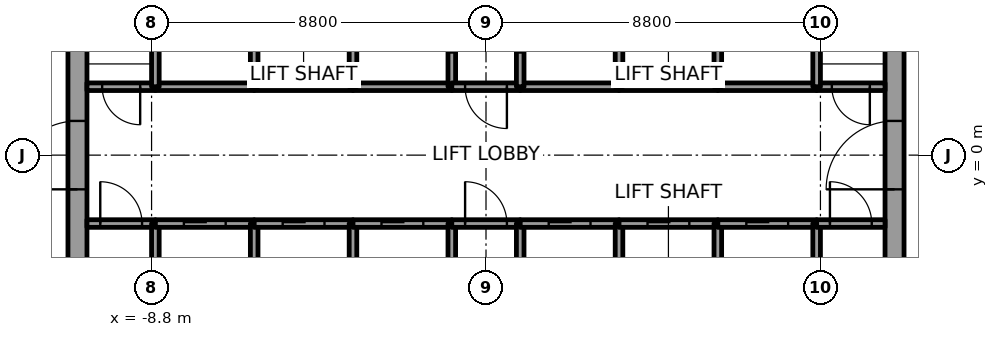
"""IFC4 building model, lengths in metres.
Left out: names, types, materials, properties, quantities, classifications, styles, units other than length and angle.
Written with IfcOpenShell. Run it as: python <this file> out.ifc"""

import sys

from ifc_helpers import new_model, si_unit, direction, frame, frame_2d, origin, place, context, subcontext, project, spatial, rectangle, extrude, element, fill, save


model = new_model("IFC4")
c1 = context("Model", 3, precision=1e-05, world=origin(), true_north=direction((0.0, 1.0)))
c2 = subcontext(c1, "Body", "Model", "MODEL_VIEW")
j1 = project(units=[si_unit("LENGTHUNIT", "METRE"), si_unit("PLANEANGLEUNIT", "RADIAN")], contexts=[c1])
p1 = place(None, origin())
s1 = spatial("IfcSite", under=j1, at=p1, CompositionType="ELEMENT")
p2 = place(p1, origin())
s2 = spatial("IfcBuilding", under=s1, at=p2, CompositionType="ELEMENT")
p3 = place(p2, frame((0.0, 0.0, 85.0)))
s3 = spatial("IfcBuildingStorey", under=s2, at=p3, CompositionType="ELEMENT", Elevation=85.0)
p4 = place(p3, frame((-10.75, -7.5, 0.0), z_axis=(0.0, 0.0, 1.0), x_axis=(0.0, 1.0, 0.0)))
e1 = element("IfcWall", 1, at=p4, inside=s3, PredefinedType="SHEAR", context=c2, shape_type="SweptSolid", body=[
    extrude(rectangle(XDim=15.0, YDim=0.5, at=frame_2d((7.5, 0.0))), origin(), (0.0, 0.0, 1.0), 3.7),
])
p5 = place(p4, frame((6.6, 0.0, 0.0)))
e2 = element("IfcOpeningElement", 2, at=p5, cuts=e1, PredefinedType="OPENING", context=c2, shape_type="SweptSolid", body=[
    extrude(rectangle(XDim=1.8, YDim=2.1, at=frame_2d((0.9, 1.05))), frame((0.0, 0.25, 0.0), z_axis=(0.0, -1.0, 0.0), x_axis=(1.0, 0.0, 0.0)), (0.0, 0.0, 1.0), 0.5),
])
p6 = place(p3, frame((10.75, -7.5, 0.0), z_axis=(0.0, 0.0, 1.0), x_axis=(0.0, 1.0, 0.0)))
e3 = element("IfcWall", 3, at=p6, inside=s3, PredefinedType="SHEAR", context=c2, shape_type="SweptSolid", body=[
    extrude(rectangle(XDim=15.0, YDim=0.5, at=frame_2d((7.5, 0.0))), origin(), (0.0, 0.0, 1.0), 3.7),
])
p7 = place(p6, frame((6.6, 0.0, 0.0)))
e4 = element("IfcOpeningElement", 4, at=p7, cuts=e3, PredefinedType="OPENING", context=c2, shape_type="SweptSolid", body=[
    extrude(rectangle(XDim=1.8, YDim=2.1, at=frame_2d((0.9, 1.05))), frame((0.0, 0.25, 0.0), z_axis=(0.0, -1.0, 0.0), x_axis=(1.0, 0.0, 0.0)), (0.0, 0.0, 1.0), 0.5),
])
p8 = place(p3, frame((-10.5, -1.8, 0.0), z_axis=(0.0, 0.0, 1.0), x_axis=(1.0, 0.0, 0.0)))
e5 = element("IfcWall", 5, at=p8, inside=s3, PredefinedType="SOLIDWALL", context=c2, shape_type="SweptSolid", body=[
    extrude(rectangle(XDim=1.8, YDim=0.2, at=frame_2d((0.9, 0.0))), origin(), (0.0, 0.0, 1.0), 3.55),
])
p9 = place(p8, frame((0.35, 0.0, 0.0)))
e6 = element("IfcOpeningElement", 6, at=p9, cuts=e5, PredefinedType="OPENING", context=c2, shape_type="SweptSolid", body=[
    extrude(rectangle(XDim=1.1, YDim=2.1, at=frame_2d((0.55, 1.05))), frame((0.0, 0.1, 0.0), z_axis=(0.0, -1.0, 0.0), x_axis=(1.0, 0.0, 0.0)), (0.0, 0.0, 1.0), 0.2),
])
p10 = place(p3, frame((-8.7, 1.8, 0.0), z_axis=(0.0, 0.0, 1.0), x_axis=(-1.0, 0.0, 0.0)))
e7 = element("IfcWall", 7, at=p10, inside=s3, PredefinedType="SOLIDWALL", context=c2, shape_type="SweptSolid", body=[
    extrude(rectangle(XDim=1.8, YDim=0.2, at=frame_2d((0.9, 0.0))), origin(), (0.0, 0.0, 1.0), 3.55),
])
p11 = place(p10, frame((0.4, 0.0, 0.0)))
e8 = element("IfcOpeningElement", 8, at=p11, cuts=e7, PredefinedType="OPENING", context=c2, shape_type="SweptSolid", body=[
    extrude(rectangle(XDim=1.0, YDim=2.1, at=frame_2d((0.5, 1.05))), frame((0.0, 0.1, 0.0), z_axis=(0.0, -1.0, 0.0), x_axis=(1.0, 0.0, 0.0)), (0.0, 0.0, 1.0), 0.2),
])
p12 = place(p3, frame((-8.7, -4.6, 0.0), z_axis=(0.0, 0.0, 1.0), x_axis=(0.0, 1.0, 0.0)))
e9 = element("IfcWall", 9, at=p12, inside=s3, PredefinedType="SOLIDWALL", context=c2, shape_type="SweptSolid", body=[
    extrude(rectangle(XDim=2.8, YDim=0.2, at=frame_2d((1.4, 0.0))), origin(), (0.0, 0.0, 1.0), 3.55),
])
p13 = place(p3, frame((-8.7, -1.8, 0.0), z_axis=(0.0, 0.0, 1.0), x_axis=(1.0, 0.0, 0.0)))
e10 = element("IfcWall", 10, at=p13, inside=s3, PredefinedType="SOLIDWALL", context=c2, shape_type="SweptSolid", body=[
    extrude(rectangle(XDim=2.6, YDim=0.2, at=frame_2d((1.3, 0.0))), origin(), (0.0, 0.0, 1.0), 3.55),
])
p14 = place(p13, frame((0.75, 0.0, 0.0)))
e11 = element("IfcOpeningElement", 11, at=p14, cuts=e10, PredefinedType="OPENING", context=c2, shape_type="SweptSolid", body=[
    extrude(rectangle(XDim=1.1, YDim=2.1, at=frame_2d((0.55, 1.05))), frame((0.0, 0.1, 0.0), z_axis=(0.0, -1.0, 0.0), x_axis=(1.0, 0.0, 0.0)), (0.0, 0.0, 1.0), 0.2),
])
p15 = place(p3, frame((-6.1, 1.8, 0.0), z_axis=(0.0, 0.0, 1.0), x_axis=(-1.0, 0.0, 0.0)))
e12 = element("IfcWall", 12, at=p15, inside=s3, PredefinedType="SOLIDWALL", context=c2, shape_type="SweptSolid", body=[
    extrude(rectangle(XDim=2.6, YDim=0.2, at=frame_2d((1.3, 0.0))), origin(), (0.0, 0.0, 1.0), 3.55),
])
for number, where, z_axis, x_axis in (
    (13, (-8.7, 1.8, 0.0), (0.0, 0.0, 1.0), (0.0, 1.0, 0.0)),
    (14, (-6.1, -4.6, 0.0), (0.0, 0.0, 1.0), (0.0, 1.0, 0.0)),
):
    element("IfcWall", number, at=place(p3, frame(where, z_axis=z_axis, x_axis=x_axis)), inside=s3, PredefinedType="SOLIDWALL", context=c2, shape_type="SweptSolid", body=[
        extrude(rectangle(XDim=2.8, YDim=0.2, at=frame_2d((1.4, 0.0))), origin(), (0.0, 0.0, 1.0), 3.55),
    ])
p16 = place(p3, frame((-6.1, -1.8, 0.0), z_axis=(0.0, 0.0, 1.0), x_axis=(1.0, 0.0, 0.0)))
e15 = element("IfcWall", 15, at=p16, inside=s3, PredefinedType="SOLIDWALL", context=c2, shape_type="SweptSolid", body=[
    extrude(rectangle(XDim=2.6, YDim=0.2, at=frame_2d((1.3, 0.0))), origin(), (0.0, 0.0, 1.0), 3.55),
])
p17 = place(p16, frame((0.75, 0.0, 0.0)))
e16 = element("IfcOpeningElement", 16, at=p17, cuts=e15, PredefinedType="OPENING", context=c2, shape_type="SweptSolid", body=[
    extrude(rectangle(XDim=1.1, YDim=2.1, at=frame_2d((0.55, 1.05))), frame((0.0, 0.1, 0.0), z_axis=(0.0, -1.0, 0.0), x_axis=(1.0, 0.0, 0.0)), (0.0, 0.0, 1.0), 0.2),
])
p18 = place(p3, frame((-3.5, 1.8, 0.0), z_axis=(0.0, 0.0, 1.0), x_axis=(-1.0, 0.0, 0.0)))
e17 = element("IfcWall", 17, at=p18, inside=s3, PredefinedType="SOLIDWALL", context=c2, shape_type="SweptSolid", body=[
    extrude(rectangle(XDim=2.6, YDim=0.2, at=frame_2d((1.3, 0.0))), origin(), (0.0, 0.0, 1.0), 3.55),
])
for number, where, z_axis, x_axis in (
    (18, (-6.1, 1.8, 0.0), (0.0, 0.0, 1.0), (0.0, 1.0, 0.0)),
    (19, (-3.5, -4.6, 0.0), (0.0, 0.0, 1.0), (0.0, 1.0, 0.0)),
):
    element("IfcWall", number, at=place(p3, frame(where, z_axis=z_axis, x_axis=x_axis)), inside=s3, PredefinedType="SOLIDWALL", context=c2, shape_type="SweptSolid", body=[
        extrude(rectangle(XDim=2.8, YDim=0.2, at=frame_2d((1.4, 0.0))), origin(), (0.0, 0.0, 1.0), 3.55),
    ])
p19 = place(p3, frame((-3.5, -1.8, 0.0), z_axis=(0.0, 0.0, 1.0), x_axis=(1.0, 0.0, 0.0)))
e20 = element("IfcWall", 20, at=p19, inside=s3, PredefinedType="SOLIDWALL", context=c2, shape_type="SweptSolid", body=[
    extrude(rectangle(XDim=2.6, YDim=0.2, at=frame_2d((1.3, 0.0))), origin(), (0.0, 0.0, 1.0), 3.55),
])
p20 = place(p19, frame((0.75, 0.0, 0.0)))
e21 = element("IfcOpeningElement", 21, at=p20, cuts=e20, PredefinedType="OPENING", context=c2, shape_type="SweptSolid", body=[
    extrude(rectangle(XDim=1.1, YDim=2.1, at=frame_2d((0.55, 1.05))), frame((0.0, 0.1, 0.0), z_axis=(0.0, -1.0, 0.0), x_axis=(1.0, 0.0, 0.0)), (0.0, 0.0, 1.0), 0.2),
])
p21 = place(p3, frame((-0.9, 1.8, 0.0), z_axis=(0.0, 0.0, 1.0), x_axis=(-1.0, 0.0, 0.0)))
e22 = element("IfcWall", 22, at=p21, inside=s3, PredefinedType="SOLIDWALL", context=c2, shape_type="SweptSolid", body=[
    extrude(rectangle(XDim=2.6, YDim=0.2, at=frame_2d((1.3, 0.0))), origin(), (0.0, 0.0, 1.0), 3.55),
])
p22 = place(p3, frame((-3.5, 4.6, 0.0), z_axis=(0.0, 0.0, 1.0), x_axis=(0.0, -1.0, 0.0)))
e23 = element("IfcWall", 23, at=p22, inside=s3, PredefinedType="SOLIDWALL", context=c2, shape_type="SweptSolid", body=[
    extrude(rectangle(XDim=2.8, YDim=0.2, at=frame_2d((1.4, 0.0))), origin(), (0.0, 0.0, 1.0), 3.55),
])
p23 = place(p3, frame((-0.9, 1.8, 0.0), z_axis=(0.0, 0.0, 1.0), x_axis=(0.0, 1.0, 0.0)))
e24 = element("IfcWall", 24, at=p23, inside=s3, PredefinedType="SOLIDWALL", context=c2, shape_type="SweptSolid", body=[
    extrude(rectangle(XDim=3.0, YDim=0.2, at=frame_2d((1.5, 0.0))), origin(), (0.0, 0.0, 1.0), 3.55),
])
p24 = place(p23, frame((0.9, 0.0, 0.0)))
e25 = element("IfcOpeningElement", 25, at=p24, cuts=e24, PredefinedType="OPENING", context=c2, shape_type="SweptSolid", body=[
    extrude(rectangle(XDim=1.2, YDim=2.1, at=frame_2d((0.6, 1.05))), frame((0.0, 0.1, 0.0), z_axis=(0.0, -1.0, 0.0), x_axis=(1.0, 0.0, 0.0)), (0.0, 0.0, 1.0), 0.2),
])
p25 = place(p3, frame((-0.9, -4.6, 0.0), z_axis=(0.0, 0.0, 1.0), x_axis=(0.0, 1.0, 0.0)))
e26 = element("IfcWall", 26, at=p25, inside=s3, PredefinedType="SOLIDWALL", context=c2, shape_type="SweptSolid", body=[
    extrude(rectangle(XDim=2.8, YDim=0.2, at=frame_2d((1.4, 0.0))), origin(), (0.0, 0.0, 1.0), 3.55),
])
p26 = place(p3, frame((-0.9, -1.8, 0.0), z_axis=(0.0, 0.0, 1.0), x_axis=(1.0, 0.0, 0.0)))
e27 = element("IfcWall", 27, at=p26, inside=s3, PredefinedType="SOLIDWALL", context=c2, shape_type="SweptSolid", body=[
    extrude(rectangle(XDim=1.8, YDim=0.2, at=frame_2d((0.9, 0.0))), origin(), (0.0, 0.0, 1.0), 3.55),
])
p27 = place(p26, frame((0.35, 0.0, 0.0)))
e28 = element("IfcOpeningElement", 28, at=p27, cuts=e27, PredefinedType="OPENING", context=c2, shape_type="SweptSolid", body=[
    extrude(rectangle(XDim=1.1, YDim=2.1, at=frame_2d((0.55, 1.05))), frame((0.0, 0.1, 0.0), z_axis=(0.0, -1.0, 0.0), x_axis=(1.0, 0.0, 0.0)), (0.0, 0.0, 1.0), 0.2),
])
p28 = place(p3, frame((0.9, 1.8, 0.0), z_axis=(0.0, 0.0, 1.0), x_axis=(-1.0, 0.0, 0.0)))
e29 = element("IfcWall", 29, at=p28, inside=s3, PredefinedType="SOLIDWALL", context=c2, shape_type="SweptSolid", body=[
    extrude(rectangle(XDim=1.8, YDim=0.2, at=frame_2d((0.9, 0.0))), origin(), (0.0, 0.0, 1.0), 3.55),
])
p29 = place(p28, frame((0.35, 0.0, 0.0)))
e30 = element("IfcOpeningElement", 30, at=p29, cuts=e29, PredefinedType="OPENING", context=c2, shape_type="SweptSolid", body=[
    extrude(rectangle(XDim=1.1, YDim=2.1, at=frame_2d((0.55, 1.05))), frame((0.0, 0.1, 0.0), z_axis=(0.0, -1.0, 0.0), x_axis=(1.0, 0.0, 0.0)), (0.0, 0.0, 1.0), 0.2),
])
p30 = place(p3, frame((0.9, -1.8, 0.0), z_axis=(0.0, 0.0, 1.0), x_axis=(0.0, -1.0, 0.0)))
e31 = element("IfcWall", 31, at=p30, inside=s3, PredefinedType="SOLIDWALL", context=c2, shape_type="SweptSolid", body=[
    extrude(rectangle(XDim=2.8, YDim=0.2, at=frame_2d((1.4, 0.0))), origin(), (0.0, 0.0, 1.0), 3.55),
])
p31 = place(p3, frame((0.9, -1.8, 0.0), z_axis=(0.0, 0.0, 1.0), x_axis=(1.0, 0.0, 0.0)))
e32 = element("IfcWall", 32, at=p31, inside=s3, PredefinedType="SOLIDWALL", context=c2, shape_type="SweptSolid", body=[
    extrude(rectangle(XDim=2.6, YDim=0.2, at=frame_2d((1.3, 0.0))), origin(), (0.0, 0.0, 1.0), 3.55),
])
p32 = place(p31, frame((0.75, 0.0, 0.0)))
e33 = element("IfcOpeningElement", 33, at=p32, cuts=e32, PredefinedType="OPENING", context=c2, shape_type="SweptSolid", body=[
    extrude(rectangle(XDim=1.1, YDim=2.1, at=frame_2d((0.55, 1.05))), frame((0.0, 0.1, 0.0), z_axis=(0.0, -1.0, 0.0), x_axis=(1.0, 0.0, 0.0)), (0.0, 0.0, 1.0), 0.2),
])
p33 = place(p3, frame((3.5, 1.8, 0.0), z_axis=(0.0, 0.0, 1.0), x_axis=(-1.0, 0.0, 0.0)))
e34 = element("IfcWall", 34, at=p33, inside=s3, PredefinedType="SOLIDWALL", context=c2, shape_type="SweptSolid", body=[
    extrude(rectangle(XDim=2.6, YDim=0.2, at=frame_2d((1.3, 0.0))), origin(), (0.0, 0.0, 1.0), 3.55),
])
p34 = place(p3, frame((0.9, 4.8, 0.0), z_axis=(0.0, 0.0, 1.0), x_axis=(0.0, -1.0, 0.0)))
e35 = element("IfcWall", 35, at=p34, inside=s3, PredefinedType="SOLIDWALL", context=c2, shape_type="SweptSolid", body=[
    extrude(rectangle(XDim=3.0, YDim=0.2, at=frame_2d((1.5, 0.0))), origin(), (0.0, 0.0, 1.0), 3.55),
])
p35 = place(p34, frame((0.9, 0.0, 0.0)))
e36 = element("IfcOpeningElement", 36, at=p35, cuts=e35, PredefinedType="OPENING", context=c2, shape_type="SweptSolid", body=[
    extrude(rectangle(XDim=1.2, YDim=2.1, at=frame_2d((0.6, 1.05))), frame((0.0, 0.1, 0.0), z_axis=(0.0, -1.0, 0.0), x_axis=(1.0, 0.0, 0.0)), (0.0, 0.0, 1.0), 0.2),
])
p36 = place(p3, frame((3.5, -4.6, 0.0), z_axis=(0.0, 0.0, 1.0), x_axis=(0.0, 1.0, 0.0)))
e37 = element("IfcWall", 37, at=p36, inside=s3, PredefinedType="SOLIDWALL", context=c2, shape_type="SweptSolid", body=[
    extrude(rectangle(XDim=2.8, YDim=0.2, at=frame_2d((1.4, 0.0))), origin(), (0.0, 0.0, 1.0), 3.55),
])
p37 = place(p3, frame((3.5, -1.8, 0.0), z_axis=(0.0, 0.0, 1.0), x_axis=(1.0, 0.0, 0.0)))
e38 = element("IfcWall", 38, at=p37, inside=s3, PredefinedType="SOLIDWALL", context=c2, shape_type="SweptSolid", body=[
    extrude(rectangle(XDim=2.6, YDim=0.2, at=frame_2d((1.3, 0.0))), origin(), (0.0, 0.0, 1.0), 3.55),
])
p38 = place(p37, frame((0.75, 0.0, 0.0)))
e39 = element("IfcOpeningElement", 39, at=p38, cuts=e38, PredefinedType="OPENING", context=c2, shape_type="SweptSolid", body=[
    extrude(rectangle(XDim=1.1, YDim=2.1, at=frame_2d((0.55, 1.05))), frame((0.0, 0.1, 0.0), z_axis=(0.0, -1.0, 0.0), x_axis=(1.0, 0.0, 0.0)), (0.0, 0.0, 1.0), 0.2),
])
p39 = place(p3, frame((6.1, 1.8, 0.0), z_axis=(0.0, 0.0, 1.0), x_axis=(-1.0, 0.0, 0.0)))
e40 = element("IfcWall", 40, at=p39, inside=s3, PredefinedType="SOLIDWALL", context=c2, shape_type="SweptSolid", body=[
    extrude(rectangle(XDim=2.6, YDim=0.2, at=frame_2d((1.3, 0.0))), origin(), (0.0, 0.0, 1.0), 3.55),
])
for number, where, z_axis, x_axis in (
    (41, (3.5, 1.8, 0.0), (0.0, 0.0, 1.0), (0.0, 1.0, 0.0)),
    (42, (6.1, -4.6, 0.0), (0.0, 0.0, 1.0), (0.0, 1.0, 0.0)),
):
    element("IfcWall", number, at=place(p3, frame(where, z_axis=z_axis, x_axis=x_axis)), inside=s3, PredefinedType="SOLIDWALL", context=c2, shape_type="SweptSolid", body=[
        extrude(rectangle(XDim=2.8, YDim=0.2, at=frame_2d((1.4, 0.0))), origin(), (0.0, 0.0, 1.0), 3.55),
    ])
p40 = place(p3, frame((6.1, -1.8, 0.0), z_axis=(0.0, 0.0, 1.0), x_axis=(1.0, 0.0, 0.0)))
e43 = element("IfcWall", 43, at=p40, inside=s3, PredefinedType="SOLIDWALL", context=c2, shape_type="SweptSolid", body=[
    extrude(rectangle(XDim=2.6, YDim=0.2, at=frame_2d((1.3, 0.0))), origin(), (0.0, 0.0, 1.0), 3.55),
])
p41 = place(p40, frame((0.75, 0.0, 0.0)))
e44 = element("IfcOpeningElement", 44, at=p41, cuts=e43, PredefinedType="OPENING", context=c2, shape_type="SweptSolid", body=[
    extrude(rectangle(XDim=1.1, YDim=2.1, at=frame_2d((0.55, 1.05))), frame((0.0, 0.1, 0.0), z_axis=(0.0, -1.0, 0.0), x_axis=(1.0, 0.0, 0.0)), (0.0, 0.0, 1.0), 0.2),
])
p42 = place(p3, frame((8.7, 1.8, 0.0), z_axis=(0.0, 0.0, 1.0), x_axis=(-1.0, 0.0, 0.0)))
e45 = element("IfcWall", 45, at=p42, inside=s3, PredefinedType="SOLIDWALL", context=c2, shape_type="SweptSolid", body=[
    extrude(rectangle(XDim=2.6, YDim=0.2, at=frame_2d((1.3, 0.0))), origin(), (0.0, 0.0, 1.0), 3.55),
])
for number, where, z_axis, x_axis in (
    (46, (6.1, 1.8, 0.0), (0.0, 0.0, 1.0), (0.0, 1.0, 0.0)),
    (47, (8.7, -1.8, 0.0), (0.0, 0.0, 1.0), (0.0, -1.0, 0.0)),
):
    element("IfcWall", number, at=place(p3, frame(where, z_axis=z_axis, x_axis=x_axis)), inside=s3, PredefinedType="SOLIDWALL", context=c2, shape_type="SweptSolid", body=[
        extrude(rectangle(XDim=2.8, YDim=0.2, at=frame_2d((1.4, 0.0))), origin(), (0.0, 0.0, 1.0), 3.55),
    ])
p43 = place(p3, frame((8.7, -1.8, 0.0), z_axis=(0.0, 0.0, 1.0), x_axis=(1.0, 0.0, 0.0)))
e48 = element("IfcWall", 48, at=p43, inside=s3, PredefinedType="SOLIDWALL", context=c2, shape_type="SweptSolid", body=[
    extrude(rectangle(XDim=1.8, YDim=0.2, at=frame_2d((0.9, 0.0))), origin(), (0.0, 0.0, 1.0), 3.55),
])
p44 = place(p43, frame((0.35, 0.0, 0.0)))
e49 = element("IfcOpeningElement", 49, at=p44, cuts=e48, PredefinedType="OPENING", context=c2, shape_type="SweptSolid", body=[
    extrude(rectangle(XDim=1.1, YDim=2.1, at=frame_2d((0.55, 1.05))), frame((0.0, 0.1, 0.0), z_axis=(0.0, -1.0, 0.0), x_axis=(1.0, 0.0, 0.0)), (0.0, 0.0, 1.0), 0.2),
])
p45 = place(p3, frame((10.5, 1.8, 0.0), z_axis=(0.0, 0.0, 1.0), x_axis=(-1.0, 0.0, 0.0)))
e50 = element("IfcWall", 50, at=p45, inside=s3, PredefinedType="SOLIDWALL", context=c2, shape_type="SweptSolid", body=[
    extrude(rectangle(XDim=1.8, YDim=0.2, at=frame_2d((0.9, 0.0))), origin(), (0.0, 0.0, 1.0), 3.55),
])
p46 = place(p45, frame((0.4, 0.0, 0.0)))
e51 = element("IfcOpeningElement", 51, at=p46, cuts=e50, PredefinedType="OPENING", context=c2, shape_type="SweptSolid", body=[
    extrude(rectangle(XDim=1.0, YDim=2.1, at=frame_2d((0.5, 1.05))), frame((0.0, 0.1, 0.0), z_axis=(0.0, -1.0, 0.0), x_axis=(1.0, 0.0, 0.0)), (0.0, 0.0, 1.0), 0.2),
])
p47 = place(p3, frame((8.7, 4.6, 0.0), z_axis=(0.0, 0.0, 1.0), x_axis=(0.0, -1.0, 0.0)))
e52 = element("IfcWall", 52, at=p47, inside=s3, PredefinedType="SOLIDWALL", context=c2, shape_type="SweptSolid", body=[
    extrude(rectangle(XDim=2.8, YDim=0.2, at=frame_2d((1.4, 0.0))), origin(), (0.0, 0.0, 1.0), 3.55),
])
p48 = place(p14, origin())
e53 = element("IfcDoor", 53, at=p48, inside=s3, OperationType="SLIDING_TO_RIGHT", PredefinedType="DOOR", context=c2, shape_type="SweptSolid", body=[
    extrude(rectangle(XDim=1.1, YDim=2.1, at=frame_2d((0.55, 1.05))), frame((0.0, 0.025, 0.0), z_axis=(0.0, -1.0, 0.0), x_axis=(1.0, 0.0, 0.0)), (0.0, 0.0, 1.0), 0.05),
])
fill(e11, e53)
p49 = place(p17, origin())
e54 = element("IfcDoor", 54, at=p49, inside=s3, OperationType="SLIDING_TO_RIGHT", PredefinedType="DOOR", context=c2, shape_type="SweptSolid", body=[
    extrude(rectangle(XDim=1.1, YDim=2.1, at=frame_2d((0.55, 1.05))), frame((0.0, 0.025, 0.0), z_axis=(0.0, -1.0, 0.0), x_axis=(1.0, 0.0, 0.0)), (0.0, 0.0, 1.0), 0.05),
])
fill(e16, e54)
p50 = place(p20, origin())
e55 = element("IfcDoor", 55, at=p50, inside=s3, OperationType="SLIDING_TO_RIGHT", PredefinedType="DOOR", context=c2, shape_type="SweptSolid", body=[
    extrude(rectangle(XDim=1.1, YDim=2.1, at=frame_2d((0.55, 1.05))), frame((0.0, 0.025, 0.0), z_axis=(0.0, -1.0, 0.0), x_axis=(1.0, 0.0, 0.0)), (0.0, 0.0, 1.0), 0.05),
])
fill(e21, e55)
p51 = place(p32, origin())
e56 = element("IfcDoor", 56, at=p51, inside=s3, OperationType="SLIDING_TO_RIGHT", PredefinedType="DOOR", context=c2, shape_type="SweptSolid", body=[
    extrude(rectangle(XDim=1.1, YDim=2.1, at=frame_2d((0.55, 1.05))), frame((0.0, 0.025, 0.0), z_axis=(0.0, -1.0, 0.0), x_axis=(1.0, 0.0, 0.0)), (0.0, 0.0, 1.0), 0.05),
])
fill(e33, e56)
p52 = place(p38, origin())
e57 = element("IfcDoor", 57, at=p52, inside=s3, OperationType="SLIDING_TO_LEFT", PredefinedType="DOOR", context=c2, shape_type="SweptSolid", body=[
    extrude(rectangle(XDim=1.1, YDim=2.1, at=frame_2d((0.55, 1.05))), frame((0.0, 0.025, 0.0), z_axis=(0.0, -1.0, 0.0), x_axis=(1.0, 0.0, 0.0)), (0.0, 0.0, 1.0), 0.05),
])
fill(e39, e57)
p53 = place(p41, origin())
e58 = element("IfcDoor", 58, at=p53, inside=s3, OperationType="SLIDING_TO_RIGHT", PredefinedType="DOOR", context=c2, shape_type="SweptSolid", body=[
    extrude(rectangle(XDim=1.1, YDim=2.1, at=frame_2d((0.55, 1.05))), frame((0.0, 0.025, 0.0), z_axis=(0.0, -1.0, 0.0), x_axis=(1.0, 0.0, 0.0)), (0.0, 0.0, 1.0), 0.05),
])
fill(e44, e58)
p54 = place(p9, origin())
e59 = element("IfcDoor", 59, at=p54, inside=s3, OperationType="SINGLE_SWING_RIGHT", PredefinedType="DOOR", context=c2, shape_type="SweptSolid", body=[
    extrude(rectangle(XDim=1.1, YDim=2.1, at=frame_2d((0.55, 1.05))), frame((0.0, 0.025, 0.0), z_axis=(0.0, -1.0, 0.0), x_axis=(1.0, 0.0, 0.0)), (0.0, 0.0, 1.0), 0.05),
])
fill(e6, e59)
p55 = place(p44, origin())
e60 = element("IfcDoor", 60, at=p55, inside=s3, OperationType="SINGLE_SWING_LEFT", PredefinedType="DOOR", context=c2, shape_type="SweptSolid", body=[
    extrude(rectangle(XDim=1.1, YDim=2.1, at=frame_2d((0.55, 1.05))), frame((0.0, 0.025, 0.0), z_axis=(0.0, -1.0, 0.0), x_axis=(1.0, 0.0, 0.0)), (0.0, 0.0, 1.0), 0.05),
])
fill(e49, e60)
p56 = place(p29, origin())
e61 = element("IfcDoor", 61, at=p56, inside=s3, OperationType="SINGLE_SWING_LEFT", PredefinedType="DOOR", context=c2, shape_type="SweptSolid", body=[
    extrude(rectangle(XDim=1.1, YDim=2.1, at=frame_2d((0.55, 1.05))), frame((0.0, 0.025, 0.0), z_axis=(0.0, -1.0, 0.0), x_axis=(1.0, 0.0, 0.0)), (0.0, 0.0, 1.0), 0.05),
])
fill(e30, e61)
p57 = place(p27, origin())
e62 = element("IfcDoor", 62, at=p57, inside=s3, OperationType="SINGLE_SWING_RIGHT", PredefinedType="DOOR", context=c2, shape_type="SweptSolid", body=[
    extrude(rectangle(XDim=1.1, YDim=2.1, at=frame_2d((0.55, 1.05))), frame((0.0, 0.025, 0.0), z_axis=(0.0, -1.0, 0.0), x_axis=(1.0, 0.0, 0.0)), (0.0, 0.0, 1.0), 0.05),
])
fill(e28, e62)
p58 = place(p11, origin())
e63 = element("IfcDoor", 63, at=p58, inside=s3, OperationType="SINGLE_SWING_RIGHT", PredefinedType="DOOR", context=c2, shape_type="SweptSolid", body=[
    extrude(rectangle(XDim=1.0, YDim=2.1, at=frame_2d((0.5, 1.05))), frame((0.0, 0.025, 0.0), z_axis=(0.0, -1.0, 0.0), x_axis=(1.0, 0.0, 0.0)), (0.0, 0.0, 1.0), 0.05),
])
fill(e8, e63)
p59 = place(p46, origin())
e64 = element("IfcDoor", 64, at=p59, inside=s3, OperationType="SINGLE_SWING_LEFT", PredefinedType="DOOR", context=c2, shape_type="SweptSolid", body=[
    extrude(rectangle(XDim=1.0, YDim=2.1, at=frame_2d((0.5, 1.05))), frame((0.0, 0.025, 0.0), z_axis=(0.0, -1.0, 0.0), x_axis=(1.0, 0.0, 0.0)), (0.0, 0.0, 1.0), 0.05),
])
fill(e51, e64)
p60 = place(p5, origin())
e65 = element("IfcDoor", 65, at=p60, inside=s3, OperationType="DOUBLE_DOOR_SINGLE_SWING", PredefinedType="DOOR", context=c2, shape_type="SweptSolid", body=[
    extrude(rectangle(XDim=1.8, YDim=2.1, at=frame_2d((0.9, 1.05))), frame((0.0, 0.025, 0.0), z_axis=(0.0, -1.0, 0.0), x_axis=(1.0, 0.0, 0.0)), (0.0, 0.0, 1.0), 0.05),
])
fill(e2, e65)
p61 = place(p7, origin())
e66 = element("IfcDoor", 66, at=p61, inside=s3, OperationType="DOUBLE_DOOR_SINGLE_SWING", PredefinedType="DOOR", context=c2, shape_type="SweptSolid", body=[
    extrude(rectangle(XDim=1.8, YDim=2.1, at=frame_2d((0.9, 1.05))), frame((0.0, 0.025, 0.0), z_axis=(0.0, -1.0, 0.0), x_axis=(1.0, 0.0, 0.0)), (0.0, 0.0, 1.0), 0.05),
])
fill(e4, e66)
save(model, sys.argv[1])
